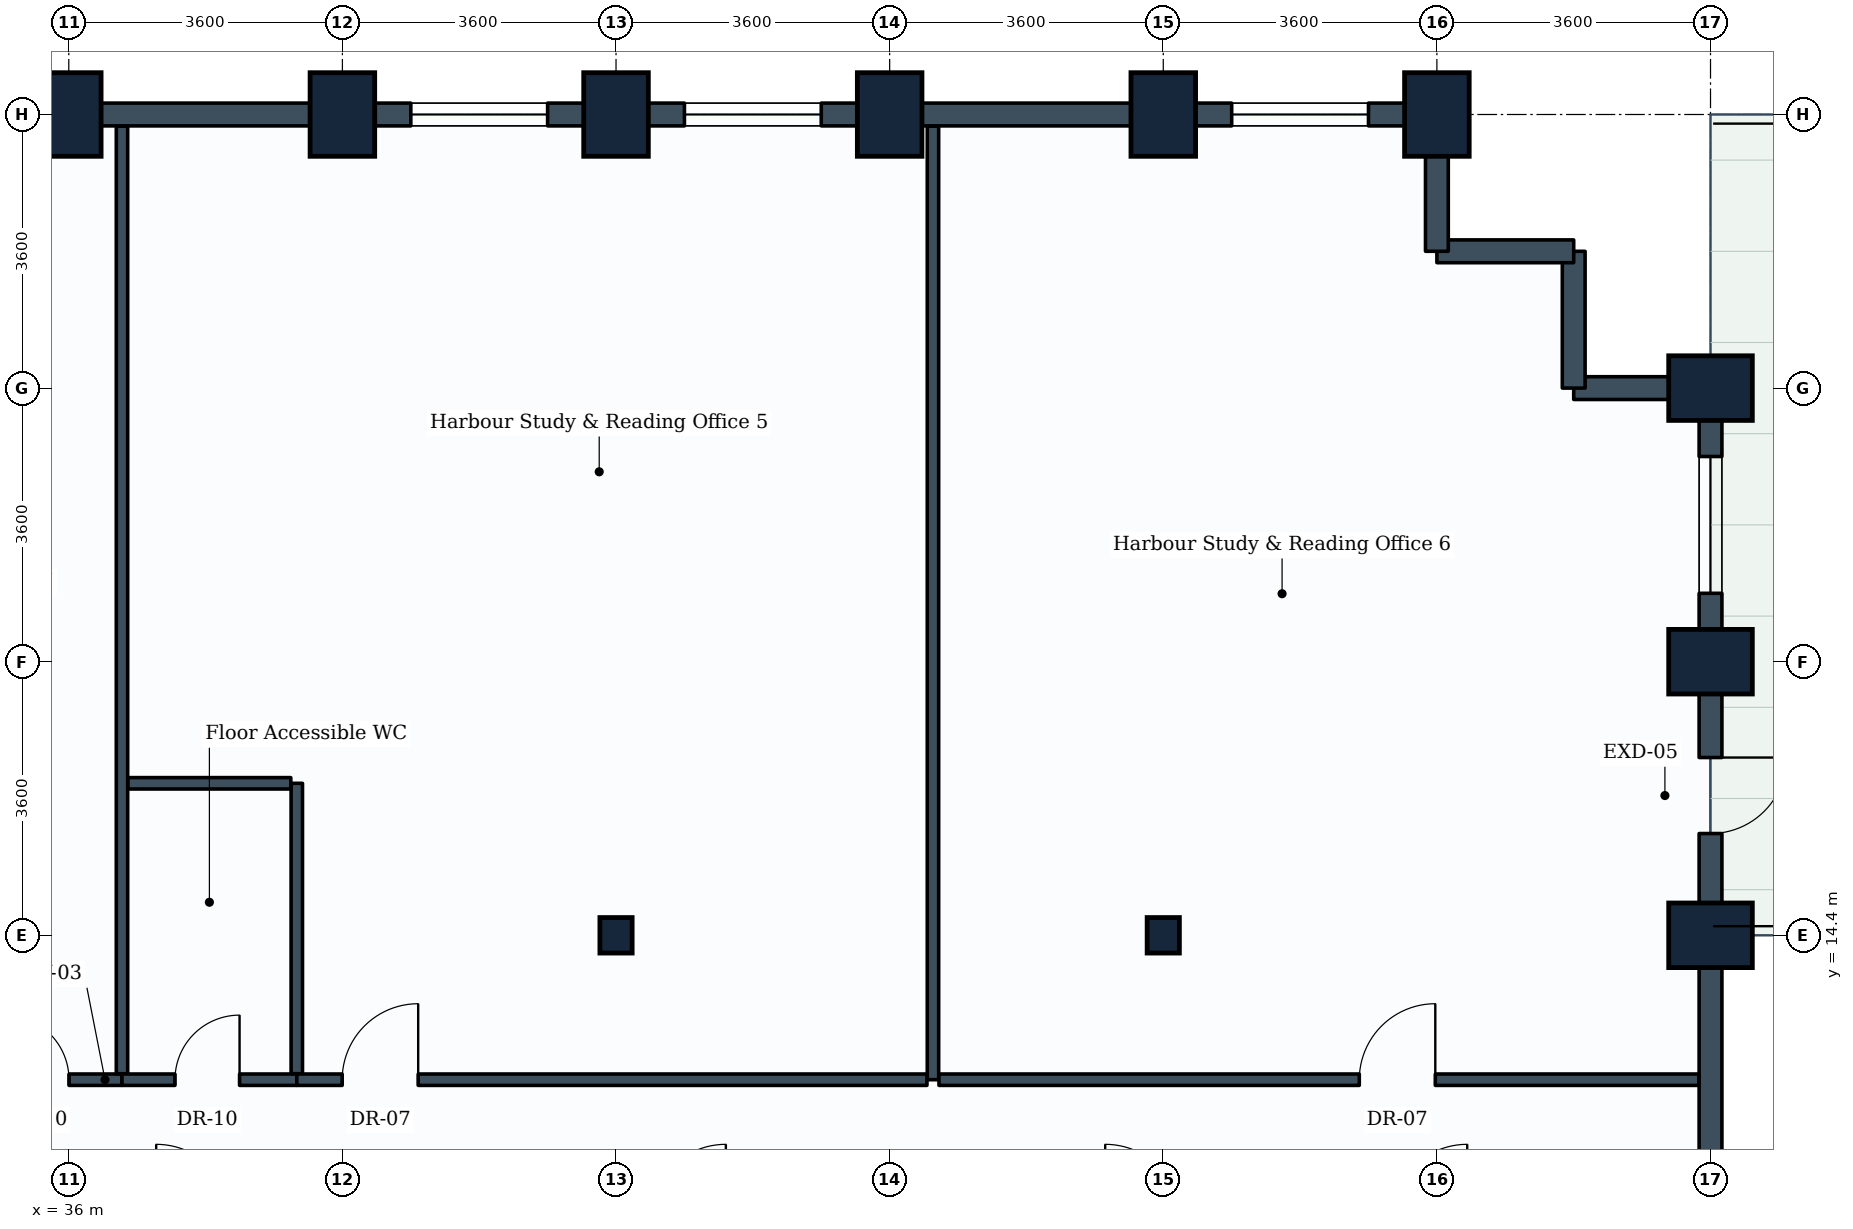
"""IFC4 building model, lengths in metres.
Left out: names, types, materials, properties, quantities, classifications, styles, units other than length and angle.
Written with IfcOpenShell. Run it as: python <this file> out.ifc"""

import sys

from ifc_helpers import new_model, si_unit, direction, frame, frame_2d, origin, origin_2d, place, context, subcontext, project, spatial, rectangle, i_section, extrude, element, fill, save


model = new_model("IFC4")
c1 = context("Model", 3, precision=1e-05, world=origin(), true_north=direction((0.0, 1.0)))
c2 = subcontext(c1, "Body", "Model", "MODEL_VIEW")
j1 = project(units=[si_unit("LENGTHUNIT", "METRE"), si_unit("PLANEANGLEUNIT", "RADIAN")], contexts=[c1])
p1 = place(None, origin())
s1 = spatial("IfcSite", under=j1, at=p1, CompositionType="ELEMENT")
p2 = place(p1, origin())
s2 = spatial("IfcBuilding", under=s1, at=p2, CompositionType="ELEMENT")
p3 = place(p2, frame((0.0, 0.0, 87.9)))
s3 = spatial("IfcBuildingStorey", under=s2, at=p3, CompositionType="ELEMENT", Elevation=87.9)
for number, where, z_axis, x_axis in (
    (1, (36.0, 25.2, 0.0), (0.0, 0.0, 1.0), (1.0, 0.0, 0.0)),
    (2, (39.6, 25.2, 0.0), (0.0, 0.0, 1.0), (1.0, 0.0, 0.0)),
):
    element("IfcColumn", number, at=place(p3, frame(where, z_axis=z_axis, x_axis=x_axis)), inside=s3, PredefinedType="COLUMN", context=c2, shape_type="SweptSolid", body=[
        extrude(rectangle(XDim=0.85, YDim=1.1, at=origin_2d()), origin(), (0.0, 0.0, 1.0), 3.9),
    ])
p4 = place(p3, frame((43.2, 14.4, 0.0), z_axis=(0.0, 0.0, 1.0), x_axis=(1.0, 0.0, 0.0)))
e3 = element("IfcColumn", 3, at=p4, inside=s3, PredefinedType="COLUMN", context=c2, shape_type="SweptSolid", body=[
    extrude(i_section(OverallWidth=0.424, OverallDepth=0.467, WebThickness=0.033, FlangeThickness=0.053, FilletRadius=0.015, at=origin_2d()), origin(), (0.0, 0.0, 1.0), 3.9),
])
for number, where, z_axis, x_axis in (
    (4, (43.2, 25.2, 0.0), (0.0, 0.0, 1.0), (1.0, 0.0, 0.0)),
    (5, (46.8, 25.2, 0.0), (0.0, 0.0, 1.0), (1.0, 0.0, 0.0)),
):
    element("IfcColumn", number, at=place(p3, frame(where, z_axis=z_axis, x_axis=x_axis)), inside=s3, PredefinedType="COLUMN", context=c2, shape_type="SweptSolid", body=[
        extrude(rectangle(XDim=0.85, YDim=1.1, at=origin_2d()), origin(), (0.0, 0.0, 1.0), 3.9),
    ])
p5 = place(p3, frame((50.4, 14.4, 0.0), z_axis=(0.0, 0.0, 1.0), x_axis=(1.0, 0.0, 0.0)))
e6 = element("IfcColumn", 6, at=p5, inside=s3, PredefinedType="COLUMN", context=c2, shape_type="SweptSolid", body=[
    extrude(i_section(OverallWidth=0.424, OverallDepth=0.467, WebThickness=0.033, FlangeThickness=0.053, FilletRadius=0.015, at=origin_2d()), origin(), (0.0, 0.0, 1.0), 3.9),
])
for number, where, z_axis, x_axis in (
    (7, (50.4, 25.2, 0.0), (0.0, 0.0, 1.0), (1.0, 0.0, 0.0)),
    (8, (54.0, 25.2, 0.0), (0.0, 0.0, 1.0), (1.0, 0.0, 0.0)),
    (9, (57.6, 14.4, 0.0), (0.0, 0.0, 1.0), (0.0, 1.0, 0.0)),
    (10, (57.6, 18.0, 0.0), (0.0, 0.0, 1.0), (0.0, 1.0, 0.0)),
    (11, (57.6, 21.6, 0.0), (0.0, 0.0, 1.0), (0.0, 1.0, 0.0)),
):
    element("IfcColumn", number, at=place(p3, frame(where, z_axis=z_axis, x_axis=x_axis)), inside=s3, PredefinedType="COLUMN", context=c2, shape_type="SweptSolid", body=[
        extrude(rectangle(XDim=0.85, YDim=1.1, at=origin_2d()), origin(), (0.0, 0.0, 1.0), 3.9),
    ])
p6 = place(p3, frame((57.6, 14.4, 0.0), z_axis=(0.0, 0.0, 1.0), x_axis=(0.0, -1.0, 0.0)))
e12 = element("IfcWall", 12, at=p6, inside=s3, PredefinedType="STANDARD", context=c2, shape_type="SweptSolid", body=[
    extrude(rectangle(XDim=3.6, YDim=0.3, at=frame_2d((1.8, 0.0))), origin(), (0.0, 0.0, 1.0), 2.93),
])
p7 = place(p3, frame((57.6, 18.0, 0.0), z_axis=(0.0, 0.0, 1.0), x_axis=(0.0, -1.0, 0.0)))
e13 = element("IfcWall", 13, at=p7, inside=s3, PredefinedType="STANDARD", context=c2, shape_type="SweptSolid", body=[
    extrude(rectangle(XDim=3.6, YDim=0.3, at=frame_2d((1.8, 0.0))), origin(), (0.0, 0.0, 1.0), 2.93),
])
p8 = place(p7, frame((1.261, 0.0, 0.0)))
e14 = element("IfcOpeningElement", 14, at=p8, cuts=e13, PredefinedType="OPENING", context=c2, shape_type="SweptSolid", body=[
    extrude(rectangle(XDim=1.0, YDim=2.1, at=frame_2d((0.5, 1.05))), frame((0.0, 0.16, 0.0), z_axis=(0.0, -1.0, 0.0), x_axis=(1.0, 0.0, 0.0)), (0.0, 0.0, 1.0), 0.32),
])
p9 = place(p3, frame((57.6, 21.6, 0.0), z_axis=(0.0, 0.0, 1.0), x_axis=(0.0, -1.0, 0.0)))
e15 = element("IfcWall", 15, at=p9, inside=s3, PredefinedType="STANDARD", context=c2, shape_type="SweptSolid", body=[
    extrude(rectangle(XDim=3.6, YDim=0.3, at=frame_2d((1.8, 0.0))), origin(), (0.0, 0.0, 1.0), 2.93),
])
p10 = place(p9, frame((0.9, 0.0, 0.85)))
e16 = element("IfcOpeningElement", 16, at=p10, cuts=e15, PredefinedType="OPENING", context=c2, shape_type="SweptSolid", body=[
    extrude(rectangle(XDim=1.8, YDim=1.35, at=frame_2d((0.9, 0.675))), frame((0.0, 0.16, 0.0), z_axis=(0.0, -1.0, 0.0), x_axis=(1.0, 0.0, 0.0)), (0.0, 0.0, 1.0), 0.32),
])
p11 = place(p3, frame((55.8, 21.6, 0.0), z_axis=(0.0, 0.0, 1.0), x_axis=(1.0, 0.0, 0.0)))
e17 = element("IfcWall", 17, at=p11, inside=s3, PredefinedType="STANDARD", context=c2, shape_type="SweptSolid", body=[
    extrude(rectangle(XDim=1.8, YDim=0.3, at=frame_2d((0.9, 0.0))), origin(), (0.0, 0.0, 1.0), 2.93),
])
p12 = place(p3, frame((55.8, 23.4, 0.0), z_axis=(0.0, 0.0, 1.0), x_axis=(0.0, -1.0, 0.0)))
e18 = element("IfcWall", 18, at=p12, inside=s3, PredefinedType="STANDARD", context=c2, shape_type="SweptSolid", body=[
    extrude(rectangle(XDim=1.8, YDim=0.3, at=frame_2d((0.9, 0.0))), origin(), (0.0, 0.0, 1.0), 3.635),
])
p13 = place(p3, frame((54.0, 23.4, 0.0), z_axis=(0.0, 0.0, 1.0), x_axis=(1.0, 0.0, 0.0)))
e19 = element("IfcWall", 19, at=p13, inside=s3, PredefinedType="STANDARD", context=c2, shape_type="SweptSolid", body=[
    extrude(rectangle(XDim=1.8, YDim=0.3, at=frame_2d((0.9, 0.0))), origin(), (0.0, 0.0, 1.0), 3.635),
])
p14 = place(p3, frame((54.0, 25.2, 0.0), z_axis=(0.0, 0.0, 1.0), x_axis=(0.0, -1.0, 0.0)))
e20 = element("IfcWall", 20, at=p14, inside=s3, PredefinedType="STANDARD", context=c2, shape_type="SweptSolid", body=[
    extrude(rectangle(XDim=1.8, YDim=0.3, at=frame_2d((0.9, 0.0))), origin(), (0.0, 0.0, 1.0), 2.93),
])
p15 = place(p3, frame((50.4, 25.2, 0.0), z_axis=(0.0, 0.0, 1.0), x_axis=(1.0, 0.0, 0.0)))
e21 = element("IfcWall", 21, at=p15, inside=s3, PredefinedType="STANDARD", context=c2, shape_type="SweptSolid", body=[
    extrude(rectangle(XDim=3.6, YDim=0.3, at=frame_2d((1.8, 0.0))), origin(), (0.0, 0.0, 1.0), 2.93),
])
p16 = place(p15, frame((0.9, 0.0, 0.85)))
e22 = element("IfcOpeningElement", 22, at=p16, cuts=e21, PredefinedType="OPENING", context=c2, shape_type="SweptSolid", body=[
    extrude(rectangle(XDim=1.8, YDim=1.35, at=frame_2d((0.9, 0.675))), frame((0.0, 0.16, 0.0), z_axis=(0.0, -1.0, 0.0), x_axis=(1.0, 0.0, 0.0)), (0.0, 0.0, 1.0), 0.32),
])
p17 = place(p3, frame((46.8, 25.2, 0.0), z_axis=(0.0, 0.0, 1.0), x_axis=(1.0, 0.0, 0.0)))
e23 = element("IfcWall", 23, at=p17, inside=s3, PredefinedType="STANDARD", context=c2, shape_type="SweptSolid", body=[
    extrude(rectangle(XDim=3.6, YDim=0.3, at=frame_2d((1.8, 0.0))), origin(), (0.0, 0.0, 1.0), 2.93),
])
p18 = place(p3, frame((43.2, 25.2, 0.0), z_axis=(0.0, 0.0, 1.0), x_axis=(1.0, 0.0, 0.0)))
e24 = element("IfcWall", 24, at=p18, inside=s3, PredefinedType="STANDARD", context=c2, shape_type="SweptSolid", body=[
    extrude(rectangle(XDim=3.6, YDim=0.3, at=frame_2d((1.8, 0.0))), origin(), (0.0, 0.0, 1.0), 2.93),
])
p19 = place(p18, frame((0.9, 0.0, 0.85)))
e25 = element("IfcOpeningElement", 25, at=p19, cuts=e24, PredefinedType="OPENING", context=c2, shape_type="SweptSolid", body=[
    extrude(rectangle(XDim=1.8, YDim=1.35, at=frame_2d((0.9, 0.675))), frame((0.0, 0.16, 0.0), z_axis=(0.0, -1.0, 0.0), x_axis=(1.0, 0.0, 0.0)), (0.0, 0.0, 1.0), 0.32),
])
p20 = place(p3, frame((39.6, 25.2, 0.0), z_axis=(0.0, 0.0, 1.0), x_axis=(1.0, 0.0, 0.0)))
e26 = element("IfcWall", 26, at=p20, inside=s3, PredefinedType="STANDARD", context=c2, shape_type="SweptSolid", body=[
    extrude(rectangle(XDim=3.6, YDim=0.3, at=frame_2d((1.8, 0.0))), origin(), (0.0, 0.0, 1.0), 2.93),
])
p21 = place(p20, frame((0.9, 0.0, 0.85)))
e27 = element("IfcOpeningElement", 27, at=p21, cuts=e26, PredefinedType="OPENING", context=c2, shape_type="SweptSolid", body=[
    extrude(rectangle(XDim=1.8, YDim=1.35, at=frame_2d((0.9, 0.675))), frame((0.0, 0.16, 0.0), z_axis=(0.0, -1.0, 0.0), x_axis=(1.0, 0.0, 0.0)), (0.0, 0.0, 1.0), 0.32),
])
for number, where, z_axis, x_axis in (
    (28, (36.0, 25.2, 0.0), (0.0, 0.0, 1.0), (1.0, 0.0, 0.0)),
    (29, (32.4, 25.2, 0.0), (0.0, 0.0, 1.0), (1.0, 0.0, 0.0)),
):
    element("IfcWall", number, at=place(p3, frame(where, z_axis=z_axis, x_axis=x_axis)), inside=s3, PredefinedType="STANDARD", context=c2, shape_type="SweptSolid", body=[
        extrude(rectangle(XDim=3.6, YDim=0.3, at=frame_2d((1.8, 0.0))), origin(), (0.0, 0.0, 1.0), 2.93),
    ])
p22 = place(p3, frame((34.479, 12.5, 0.0), z_axis=(0.0, 0.0, 1.0), x_axis=(1.0, 0.0, 0.0)))
e30 = element("IfcWall", 30, at=p22, inside=s3, PredefinedType="PARTITIONING", context=c2, shape_type="SweptSolid", body=[
    extrude(rectangle(XDim=2.221, YDim=0.15, at=frame_2d((1.11, 0.0))), origin(), (0.0, 0.0, 1.0), 3.18),
])
p23 = place(p22, frame((0.674, 0.0, 0.0)))
e31 = element("IfcOpeningElement", 31, at=p23, cuts=e30, PredefinedType="OPENING", context=c2, shape_type="SweptSolid", body=[
    extrude(rectangle(XDim=0.85, YDim=2.1, at=frame_2d((0.425, 1.05))), frame((0.0, 0.085, 0.0), z_axis=(0.0, -1.0, 0.0), x_axis=(1.0, 0.0, 0.0)), (0.0, 0.0, 1.0), 0.17),
])
p24 = place(p3, frame((36.7, 12.579, 0.0), z_axis=(0.0, 0.0, 1.0), x_axis=(0.0, 1.0, 0.0)))
e32 = element("IfcWall", 32, at=p24, inside=s3, PredefinedType="PARTITIONING", context=c2, shape_type="SweptSolid", body=[
    extrude(rectangle(XDim=12.467, YDim=0.15, at=frame_2d((6.233, 0.0))), origin(), (0.0, 0.0, 1.0), 2.93),
])
p25 = place(p3, frame((36.7, 12.5, 0.0), z_axis=(0.0, 0.0, 1.0), x_axis=(1.0, 0.0, 0.0)))
e33 = element("IfcWall", 33, at=p25, inside=s3, PredefinedType="PARTITIONING", context=c2, shape_type="SweptSolid", body=[
    extrude(rectangle(XDim=2.3, YDim=0.15, at=frame_2d((1.15, 0.0))), origin(), (0.0, 0.0, 1.0), 3.635),
])
p26 = place(p25, frame((0.697, 0.0, 0.0)))
e34 = element("IfcOpeningElement", 34, at=p26, cuts=e33, PredefinedType="OPENING", context=c2, shape_type="SweptSolid", body=[
    extrude(rectangle(XDim=0.85, YDim=2.1, at=frame_2d((0.425, 1.05))), frame((0.0, 0.085, 0.0), z_axis=(0.0, -1.0, 0.0), x_axis=(1.0, 0.0, 0.0)), (0.0, 0.0, 1.0), 0.17),
])
p27 = place(p3, frame((39.0, 12.579, 0.0), z_axis=(0.0, 0.0, 1.0), x_axis=(0.0, 1.0, 0.0)))
e35 = element("IfcWall", 35, at=p27, inside=s3, PredefinedType="PARTITIONING", context=c2, shape_type="SweptSolid", body=[
    extrude(rectangle(XDim=3.821, YDim=0.15, at=frame_2d((1.91, 0.0))), origin(), (0.0, 0.0, 1.0), 3.18),
])
p28 = place(p3, frame((36.779, 16.4, 0.0), z_axis=(0.0, 0.0, 1.0), x_axis=(1.0, 0.0, 0.0)))
e36 = element("IfcWall", 36, at=p28, inside=s3, PredefinedType="PARTITIONING", context=c2, shape_type="SweptSolid", body=[
    extrude(rectangle(XDim=2.142, YDim=0.15, at=frame_2d((1.071, 0.0))), origin(), (0.0, 0.0, 1.0), 3.635),
])
p29 = place(p3, frame((47.37, 12.5, 0.0), z_axis=(0.0, 0.0, 1.0), x_axis=(0.0, 1.0, 0.0)))
e37 = element("IfcWall", 37, at=p29, inside=s3, PredefinedType="PARTITIONING", context=c2, shape_type="SweptSolid", body=[
    extrude(rectangle(XDim=12.546, YDim=0.15, at=frame_2d((6.273, 0.0))), origin(), (0.0, 0.0, 1.0), 2.93),
])
p30 = place(p3, frame((39.0, 12.5, 0.0), z_axis=(0.0, 0.0, 1.0), x_axis=(1.0, 0.0, 0.0)))
e38 = element("IfcWall", 38, at=p30, inside=s3, PredefinedType="PARTITIONING", context=c2, shape_type="SweptSolid", body=[
    extrude(rectangle(XDim=8.291, YDim=0.15, at=frame_2d((4.146, 0.0))), origin(), (0.0, 0.0, 1.0), 3.19),
])
p31 = place(p30, frame((0.597, 0.0, 0.0)))
e39 = element("IfcOpeningElement", 39, at=p31, cuts=e38, PredefinedType="OPENING", context=c2, shape_type="SweptSolid", body=[
    extrude(rectangle(XDim=1.0, YDim=2.1, at=frame_2d((0.5, 1.05))), frame((0.0, 0.085, 0.0), z_axis=(0.0, -1.0, 0.0), x_axis=(1.0, 0.0, 0.0)), (0.0, 0.0, 1.0), 0.17),
])
p32 = place(p3, frame((47.449, 12.5, 0.0), z_axis=(0.0, 0.0, 1.0), x_axis=(1.0, 0.0, 0.0)))
e40 = element("IfcWall", 40, at=p32, inside=s3, PredefinedType="PARTITIONING", context=c2, shape_type="SweptSolid", body=[
    extrude(rectangle(XDim=9.997, YDim=0.15, at=frame_2d((4.999, 0.0))), origin(), (0.0, 0.0, 1.0), 2.93),
])
p33 = place(p32, frame((5.53, 0.0, 0.0)))
e41 = element("IfcOpeningElement", 41, at=p33, cuts=e40, PredefinedType="OPENING", context=c2, shape_type="SweptSolid", body=[
    extrude(rectangle(XDim=1.0, YDim=2.1, at=frame_2d((0.5, 1.05))), frame((0.0, 0.085, 0.0), z_axis=(0.0, -1.0, 0.0), x_axis=(1.0, 0.0, 0.0)), (0.0, 0.0, 1.0), 0.17),
])
p34 = place(p8, origin())
e42 = element("IfcDoor", 42, at=p34, inside=s3, OperationType="SINGLE_SWING_LEFT", PredefinedType="DOOR", context=c2, shape_type="SweptSolid", body=[
    extrude(rectangle(XDim=1.0, YDim=2.1, at=frame_2d((0.5, 1.05))), frame((0.0, 0.025, 0.0), z_axis=(0.0, -1.0, 0.0), x_axis=(1.0, 0.0, 0.0)), (0.0, 0.0, 1.0), 0.05),
])
fill(e14, e42)
p35 = place(p10, origin())
e43 = element("IfcWindow", 43, at=p35, inside=s3, PartitioningType="SINGLE_PANEL", PredefinedType="WINDOW", context=c2, shape_type="SweptSolid", body=[
    extrude(rectangle(XDim=1.8, YDim=1.35, at=frame_2d((0.9, 0.675))), frame((0.0, 0.03, 0.0), z_axis=(0.0, -1.0, 0.0), x_axis=(1.0, 0.0, 0.0)), (0.0, 0.0, 1.0), 0.06),
])
fill(e16, e43)
p36 = place(p16, origin())
e44 = element("IfcWindow", 44, at=p36, inside=s3, PartitioningType="SINGLE_PANEL", PredefinedType="WINDOW", context=c2, shape_type="SweptSolid", body=[
    extrude(rectangle(XDim=1.8, YDim=1.35, at=frame_2d((0.9, 0.675))), frame((0.0, 0.03, 0.0), z_axis=(0.0, -1.0, 0.0), x_axis=(1.0, 0.0, 0.0)), (0.0, 0.0, 1.0), 0.06),
])
fill(e22, e44)
p37 = place(p19, origin())
e45 = element("IfcWindow", 45, at=p37, inside=s3, PartitioningType="SINGLE_PANEL", PredefinedType="WINDOW", context=c2, shape_type="SweptSolid", body=[
    extrude(rectangle(XDim=1.8, YDim=1.35, at=frame_2d((0.9, 0.675))), frame((0.0, 0.03, 0.0), z_axis=(0.0, -1.0, 0.0), x_axis=(1.0, 0.0, 0.0)), (0.0, 0.0, 1.0), 0.06),
])
fill(e25, e45)
p38 = place(p21, origin())
e46 = element("IfcWindow", 46, at=p38, inside=s3, PartitioningType="SINGLE_PANEL", PredefinedType="WINDOW", context=c2, shape_type="SweptSolid", body=[
    extrude(rectangle(XDim=1.8, YDim=1.35, at=frame_2d((0.9, 0.675))), frame((0.0, 0.03, 0.0), z_axis=(0.0, -1.0, 0.0), x_axis=(1.0, 0.0, 0.0)), (0.0, 0.0, 1.0), 0.06),
])
fill(e27, e46)
p39 = place(p23, origin())
e47 = element("IfcDoor", 47, at=p39, inside=s3, OperationType="SINGLE_SWING_LEFT", PredefinedType="DOOR", context=c2, shape_type="SweptSolid", body=[
    extrude(rectangle(XDim=0.85, YDim=2.1, at=frame_2d((0.425, 1.05))), frame((0.0, 0.025, 0.0), z_axis=(0.0, -1.0, 0.0), x_axis=(1.0, 0.0, 0.0)), (0.0, 0.0, 1.0), 0.05),
])
fill(e31, e47)
p40 = place(p26, origin())
e48 = element("IfcDoor", 48, at=p40, inside=s3, OperationType="SINGLE_SWING_RIGHT", PredefinedType="DOOR", context=c2, shape_type="SweptSolid", body=[
    extrude(rectangle(XDim=0.85, YDim=2.1, at=frame_2d((0.425, 1.05))), frame((0.0, 0.025, 0.0), z_axis=(0.0, -1.0, 0.0), x_axis=(1.0, 0.0, 0.0)), (0.0, 0.0, 1.0), 0.05),
])
fill(e34, e48)
p41 = place(p31, origin())
e49 = element("IfcDoor", 49, at=p41, inside=s3, OperationType="SINGLE_SWING_RIGHT", PredefinedType="DOOR", context=c2, shape_type="SweptSolid", body=[
    extrude(rectangle(XDim=1.0, YDim=2.1, at=frame_2d((0.5, 1.05))), frame((0.0, 0.025, 0.0), z_axis=(0.0, -1.0, 0.0), x_axis=(1.0, 0.0, 0.0)), (0.0, 0.0, 1.0), 0.05),
])
fill(e39, e49)
p42 = place(p33, origin())
e50 = element("IfcDoor", 50, at=p42, inside=s3, OperationType="SINGLE_SWING_RIGHT", PredefinedType="DOOR", context=c2, shape_type="SweptSolid", body=[
    extrude(rectangle(XDim=1.0, YDim=2.1, at=frame_2d((0.5, 1.05))), frame((0.0, 0.025, 0.0), z_axis=(0.0, -1.0, 0.0), x_axis=(1.0, 0.0, 0.0)), (0.0, 0.0, 1.0), 0.05),
])
fill(e41, e50)
save(model, sys.argv[1])
